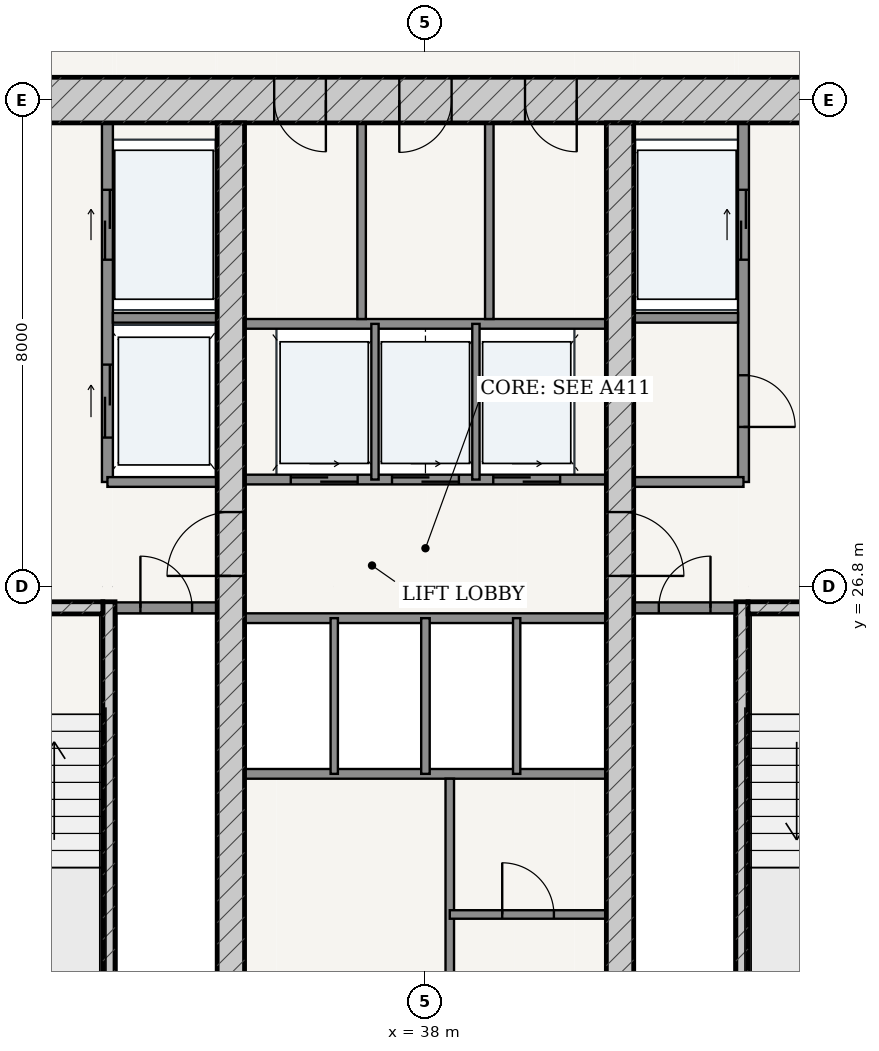
"""IFC4 building model, lengths in metres.
Left out: names, types, materials, properties, quantities, classifications, styles, units other than length and angle.
Written with IfcOpenShell. Run it as: python <this file> out.ifc"""

import sys

from ifc_helpers import new_model, si_unit, direction, frame, frame_2d, origin, place, context, subcontext, project, spatial, rectangle, extrude, source, transform, mapped, element, fill, save


model = new_model("IFC4")
c1 = context("Model", 3, precision=1e-05, world=origin(), true_north=direction((-0.2419218956, 0.970295726276)))
c2 = subcontext(c1, "Body", "Model", "MODEL_VIEW")
j1 = project(units=[si_unit("LENGTHUNIT", "METRE"), si_unit("PLANEANGLEUNIT", "RADIAN")], contexts=[c1])
p1 = place(None, origin())
s1 = spatial("IfcSite", under=j1, at=p1, CompositionType="ELEMENT")
p2 = place(p1, origin())
s2 = spatial("IfcBuilding", under=s1, at=p2, CompositionType="ELEMENT")
p3 = place(p2, frame((0.0, 0.0, 52.8)))
s3 = spatial("IfcBuildingStorey", under=s2, at=p3, CompositionType="ELEMENT", Elevation=52.8)
p4 = place(p3, frame((28.625, 34.8, 0.0), z_axis=(0.0, 0.0, 1.0), x_axis=(1.0, 0.0, 0.0)))
e1 = element("IfcWall", 1, at=p4, inside=s3, PredefinedType="SHEAR", context=c2, shape_type="SweptSolid", body=[
    extrude(rectangle(XDim=18.75, YDim=0.75, at=frame_2d((9.375, 0.0))), origin(), (0.0, 0.0, 1.0), 3.32),
])
p5 = place(p4, frame((6.887, 0.0, 0.0)))
e2 = element("IfcOpeningElement", 2, at=p5, cuts=e1, PredefinedType="OPENING", context=c2, shape_type="SweptSolid", body=[
    extrude(rectangle(XDim=0.85, YDim=2.1, at=frame_2d((0.425, 1.05))), frame((0.0, 0.385, 0.0), z_axis=(0.0, -1.0, 0.0), x_axis=(1.0, 0.0, 0.0)), (0.0, 0.0, 1.0), 0.77),
])
p6 = place(p4, frame((8.945, 0.0, 0.0)))
e3 = element("IfcOpeningElement", 3, at=p6, cuts=e1, PredefinedType="OPENING", context=c2, shape_type="SweptSolid", body=[
    extrude(rectangle(XDim=0.86, YDim=2.1, at=frame_2d((0.43, 1.05))), frame((0.0, 0.385, 0.0), z_axis=(0.0, -1.0, 0.0), x_axis=(1.0, 0.0, 0.0)), (0.0, 0.0, 1.0), 0.77),
])
p7 = place(p4, frame((11.012, 0.0, 0.0)))
e4 = element("IfcOpeningElement", 4, at=p7, cuts=e1, PredefinedType="OPENING", context=c2, shape_type="SweptSolid", body=[
    extrude(rectangle(XDim=0.85, YDim=2.1, at=frame_2d((0.425, 1.05))), frame((0.0, 0.385, 0.0), z_axis=(0.0, -1.0, 0.0), x_axis=(1.0, 0.0, 0.0)), (0.0, 0.0, 1.0), 0.77),
])
p8 = place(p3, frame((32.795, 19.175, 0.0), z_axis=(0.0, 0.0, 1.0), x_axis=(0.0, 1.0, 0.0)))
e5 = element("IfcWall", 5, at=p8, inside=s3, PredefinedType="SOLIDWALL", context=c2, shape_type="SweptSolid", body=[
    extrude(rectangle(XDim=7.375, YDim=0.2, at=frame_2d((3.688, 0.0))), origin(), (0.0, 0.0, 1.0), 3.32),
])
p9 = place(p3, frame((29.375, 26.45, 0.0), z_axis=(0.0, 0.0, 1.0), x_axis=(1.0, 0.0, 0.0)))
e6 = element("IfcWall", 6, at=p9, inside=s3, PredefinedType="SOLIDWALL", context=c2, shape_type="SweptSolid", body=[
    extrude(rectangle(XDim=3.32, YDim=0.2, at=frame_2d((1.66, 0.0))), origin(), (0.0, 0.0, 1.0), 3.32),
])
p10 = place(p9, frame((1.185, 0.0, 0.0)))
e7 = element("IfcOpeningElement", 7, at=p10, cuts=e6, PredefinedType="OPENING", context=c2, shape_type="SweptSolid", body=[
    extrude(rectangle(XDim=0.95, YDim=2.15, at=frame_2d((0.475, 1.075))), frame((0.0, 0.11, 0.0), z_axis=(0.0, -1.0, 0.0), x_axis=(1.0, 0.0, 0.0)), (0.0, 0.0, 1.0), 0.22),
])
p11 = place(p3, frame((43.205, 19.175, 0.0), z_axis=(0.0, 0.0, 1.0), x_axis=(0.0, 1.0, 0.0)))
e8 = element("IfcWall", 8, at=p11, inside=s3, PredefinedType="SOLIDWALL", context=c2, shape_type="SweptSolid", body=[
    extrude(rectangle(XDim=7.375, YDim=0.2, at=frame_2d((3.688, 0.0))), origin(), (0.0, 0.0, 1.0), 3.32),
])
p12 = place(p3, frame((43.305, 26.45, 0.0), z_axis=(0.0, 0.0, 1.0), x_axis=(1.0, 0.0, 0.0)))
e9 = element("IfcWall", 9, at=p12, inside=s3, PredefinedType="SOLIDWALL", context=c2, shape_type="SweptSolid", body=[
    extrude(rectangle(XDim=3.32, YDim=0.2, at=frame_2d((1.66, 0.0))), origin(), (0.0, 0.0, 1.0), 3.32),
])
p13 = place(p12, frame((1.185, 0.0, 0.0)))
e10 = element("IfcOpeningElement", 10, at=p13, cuts=e9, PredefinedType="OPENING", context=c2, shape_type="SweptSolid", body=[
    extrude(rectangle(XDim=0.95, YDim=2.15, at=frame_2d((0.475, 1.075))), frame((0.0, 0.11, 0.0), z_axis=(0.0, -1.0, 0.0), x_axis=(1.0, 0.0, 0.0)), (0.0, 0.0, 1.0), 0.22),
])
p14 = place(p3, frame((34.8, 19.175, 0.0), z_axis=(0.0, 0.0, 1.0), x_axis=(0.0, 1.0, 0.0)))
e11 = element("IfcWall", 11, at=p14, inside=s3, PredefinedType="SHEAR", context=c2, shape_type="SweptSolid", body=[
    extrude(rectangle(XDim=15.25, YDim=0.45, at=frame_2d((7.625, 0.0))), origin(), (0.0, 0.0, 1.0), 3.32),
])
p15 = place(p14, frame((7.8, 0.0, 0.0)))
e12 = element("IfcOpeningElement", 12, at=p15, cuts=e11, PredefinedType="OPENING", context=c2, shape_type="SweptSolid", body=[
    extrude(rectangle(XDim=1.05, YDim=2.15, at=frame_2d((0.525, 1.075))), frame((0.0, 0.235, 0.0), z_axis=(0.0, -1.0, 0.0), x_axis=(1.0, 0.0, 0.0)), (0.0, 0.0, 1.0), 0.47),
])
p16 = place(p3, frame((41.2, 19.175, 0.0), z_axis=(0.0, 0.0, 1.0), x_axis=(0.0, 1.0, 0.0)))
e13 = element("IfcWall", 13, at=p16, inside=s3, PredefinedType="SHEAR", context=c2, shape_type="SweptSolid", body=[
    extrude(rectangle(XDim=15.25, YDim=0.45, at=frame_2d((7.625, 0.0))), origin(), (0.0, 0.0, 1.0), 3.32),
])
p17 = place(p16, frame((7.8, 0.0, 0.0)))
e14 = element("IfcOpeningElement", 14, at=p17, cuts=e13, PredefinedType="OPENING", context=c2, shape_type="SweptSolid", body=[
    extrude(rectangle(XDim=1.05, YDim=2.15, at=frame_2d((0.525, 1.075))), frame((0.0, 0.235, 0.0), z_axis=(0.0, -1.0, 0.0), x_axis=(1.0, 0.0, 0.0)), (0.0, 0.0, 1.0), 0.47),
])
p18 = place(p3, frame((32.9, 26.45, 0.0), z_axis=(0.0, 0.0, 1.0), x_axis=(1.0, 0.0, 0.0)))
e15 = element("IfcWall", 15, at=p18, inside=s3, PredefinedType="PARTITIONING", context=c2, shape_type="SweptSolid", body=[
    extrude(rectangle(XDim=1.675, YDim=0.18, at=frame_2d((0.837, 0.0))), origin(), (0.0, 0.0, 1.0), 3.32),
])
p19 = place(p18, frame((0.413, 0.0, 0.0)))
e16 = element("IfcOpeningElement", 16, at=p19, cuts=e15, PredefinedType="OPENING", context=c2, shape_type="SweptSolid", body=[
    extrude(rectangle(XDim=0.85, YDim=2.1, at=frame_2d((0.425, 1.05))), frame((0.0, 0.1, 0.0), z_axis=(0.0, -1.0, 0.0), x_axis=(1.0, 0.0, 0.0)), (0.0, 0.0, 1.0), 0.2),
])
p20 = place(p3, frame((41.425, 26.45, 0.0), z_axis=(0.0, 0.0, 1.0), x_axis=(1.0, 0.0, 0.0)))
e17 = element("IfcWall", 17, at=p20, inside=s3, PredefinedType="PARTITIONING", context=c2, shape_type="SweptSolid", body=[
    extrude(rectangle(XDim=1.675, YDim=0.18, at=frame_2d((0.837, 0.0))), origin(), (0.0, 0.0, 1.0), 3.32),
])
p21 = place(p20, frame((0.413, 0.0, 0.0)))
e18 = element("IfcOpeningElement", 18, at=p21, cuts=e17, PredefinedType="OPENING", context=c2, shape_type="SweptSolid", body=[
    extrude(rectangle(XDim=0.85, YDim=2.1, at=frame_2d((0.425, 1.05))), frame((0.0, 0.1, 0.0), z_axis=(0.0, -1.0, 0.0), x_axis=(1.0, 0.0, 0.0)), (0.0, 0.0, 1.0), 0.2),
])
p22 = place(p3, frame((32.77, 28.52, 0.0), z_axis=(0.0, 0.0, 1.0), x_axis=(0.0, 1.0, 0.0)))
e19 = element("IfcWall", 19, at=p22, inside=s3, PredefinedType="PARTITIONING", context=c2, shape_type="SweptSolid", body=[
    extrude(rectangle(XDim=5.905, YDim=0.18, at=frame_2d((2.953, 0.0))), origin(), (0.0, 0.0, 1.0), 3.32),
])
p23 = place(p22, frame((3.655, 0.0, 0.0)))
e20 = element("IfcOpeningElement", 20, at=p23, cuts=e19, PredefinedType="OPENING", context=c2, shape_type="SweptSolid", body=[
    extrude(rectangle(XDim=1.15, YDim=2.2, at=frame_2d((0.575, 1.1))), frame((0.0, 0.1, 0.0), z_axis=(0.0, -1.0, 0.0), x_axis=(1.0, 0.0, 0.0)), (0.0, 0.0, 1.0), 0.2),
])
p24 = place(p22, frame((0.73, 0.0, 0.0)))
e21 = element("IfcOpeningElement", 21, at=p24, cuts=e19, PredefinedType="OPENING", context=c2, shape_type="SweptSolid", body=[
    extrude(rectangle(XDim=1.2, YDim=2.25, at=frame_2d((0.6, 1.125))), frame((0.0, 0.1, 0.0), z_axis=(0.0, -1.0, 0.0), x_axis=(1.0, 0.0, 0.0)), (0.0, 0.0, 1.0), 0.2),
])
p25 = place(p3, frame((32.86, 31.22, 0.0), z_axis=(0.0, 0.0, 1.0), x_axis=(1.0, 0.0, 0.0)))
e22 = element("IfcWall", 22, at=p25, inside=s3, PredefinedType="PARTITIONING", context=c2, shape_type="SweptSolid", body=[
    extrude(rectangle(XDim=1.715, YDim=0.16, at=frame_2d((0.857, 0.0))), origin(), (0.0, 0.0, 1.0), 3.32),
])
p26 = place(p3, frame((32.77, 28.52, 0.0), z_axis=(0.0, 0.0, 1.0), x_axis=(1.0, 0.0, 0.0)))
e23 = element("IfcWall", 23, at=p26, inside=s3, PredefinedType="PARTITIONING", context=c2, shape_type="SweptSolid", body=[
    extrude(rectangle(XDim=1.805, YDim=0.16, at=frame_2d((0.902, 0.0))), origin(), (0.0, 0.0, 1.0), 3.32),
])
p27 = place(p3, frame((43.23, 28.52, 0.0), z_axis=(0.0, 0.0, 1.0), x_axis=(0.0, 1.0, 0.0)))
e24 = element("IfcWall", 24, at=p27, inside=s3, PredefinedType="PARTITIONING", context=c2, shape_type="SweptSolid", body=[
    extrude(rectangle(XDim=5.905, YDim=0.18, at=frame_2d((2.953, 0.0))), origin(), (0.0, 0.0, 1.0), 3.32),
])
p28 = place(p27, frame((0.905, 0.0, 0.0)))
e25 = element("IfcOpeningElement", 25, at=p28, cuts=e24, PredefinedType="OPENING", context=c2, shape_type="SweptSolid", body=[
    extrude(rectangle(XDim=0.85, YDim=2.1, at=frame_2d((0.425, 1.05))), frame((0.0, 0.1, 0.0), z_axis=(0.0, -1.0, 0.0), x_axis=(1.0, 0.0, 0.0)), (0.0, 0.0, 1.0), 0.2),
])
p29 = place(p27, frame((3.655, 0.0, 0.0)))
e26 = element("IfcOpeningElement", 26, at=p29, cuts=e24, PredefinedType="OPENING", context=c2, shape_type="SweptSolid", body=[
    extrude(rectangle(XDim=1.15, YDim=2.2, at=frame_2d((0.575, 1.1))), frame((0.0, 0.1, 0.0), z_axis=(0.0, -1.0, 0.0), x_axis=(1.0, 0.0, 0.0)), (0.0, 0.0, 1.0), 0.2),
])
p30 = place(p3, frame((41.425, 31.22, 0.0), z_axis=(0.0, 0.0, 1.0), x_axis=(1.0, 0.0, 0.0)))
e27 = element("IfcWall", 27, at=p30, inside=s3, PredefinedType="PARTITIONING", context=c2, shape_type="SweptSolid", body=[
    extrude(rectangle(XDim=1.715, YDim=0.16, at=frame_2d((0.857, 0.0))), origin(), (0.0, 0.0, 1.0), 3.32),
])
p31 = place(p3, frame((41.425, 28.52, 0.0), z_axis=(0.0, 0.0, 1.0), x_axis=(1.0, 0.0, 0.0)))
e28 = element("IfcWall", 28, at=p31, inside=s3, PredefinedType="PARTITIONING", context=c2, shape_type="SweptSolid", body=[
    extrude(rectangle(XDim=1.805, YDim=0.16, at=frame_2d((0.902, 0.0))), origin(), (0.0, 0.0, 1.0), 3.32),
])
p32 = place(p3, frame((35.025, 28.56, 0.0), z_axis=(0.0, 0.0, 1.0), x_axis=(1.0, 0.0, 0.0)))
e29 = element("IfcWall", 29, at=p32, inside=s3, PredefinedType="PARTITIONING", context=c2, shape_type="SweptSolid", body=[
    extrude(rectangle(XDim=5.95, YDim=0.16, at=frame_2d((2.975, 0.0))), origin(), (0.0, 0.0, 1.0), 3.32),
])
p33 = place(p32, frame((0.76, 0.0, 0.0)))
e30 = element("IfcOpeningElement", 30, at=p33, cuts=e29, PredefinedType="OPENING", context=c2, shape_type="SweptSolid", body=[
    extrude(rectangle(XDim=1.1, YDim=2.2, at=frame_2d((0.55, 1.1))), frame((0.0, 0.09, 0.0), z_axis=(0.0, -1.0, 0.0), x_axis=(1.0, 0.0, 0.0)), (0.0, 0.0, 1.0), 0.18),
])
p34 = place(p32, frame((2.425, 0.0, 0.0)))
e31 = element("IfcOpeningElement", 31, at=p34, cuts=e29, PredefinedType="OPENING", context=c2, shape_type="SweptSolid", body=[
    extrude(rectangle(XDim=1.1, YDim=2.2, at=frame_2d((0.55, 1.1))), frame((0.0, 0.09, 0.0), z_axis=(0.0, -1.0, 0.0), x_axis=(1.0, 0.0, 0.0)), (0.0, 0.0, 1.0), 0.18),
])
p35 = place(p32, frame((4.09, 0.0, 0.0)))
e32 = element("IfcOpeningElement", 32, at=p35, cuts=e29, PredefinedType="OPENING", context=c2, shape_type="SweptSolid", body=[
    extrude(rectangle(XDim=1.1, YDim=2.2, at=frame_2d((0.55, 1.1))), frame((0.0, 0.09, 0.0), z_axis=(0.0, -1.0, 0.0), x_axis=(1.0, 0.0, 0.0)), (0.0, 0.0, 1.0), 0.18),
])
p36 = place(p3, frame((35.025, 31.12, 0.0), z_axis=(0.0, 0.0, 1.0), x_axis=(1.0, 0.0, 0.0)))
e33 = element("IfcWall", 33, at=p36, inside=s3, PredefinedType="PARTITIONING", context=c2, shape_type="SweptSolid", body=[
    extrude(rectangle(XDim=5.95, YDim=0.16, at=frame_2d((2.975, 0.0))), origin(), (0.0, 0.0, 1.0), 3.32),
])
for number, where, z_axis, x_axis in (
    (34, (37.17, 28.56, 0.0), (0.0, 0.0, 1.0), (0.0, 1.0, 0.0)),
    (35, (38.83, 28.56, 0.0), (0.0, 0.0, 1.0), (0.0, 1.0, 0.0)),
):
    element("IfcWall", number, at=place(p3, frame(where, z_axis=z_axis, x_axis=x_axis)), inside=s3, PredefinedType="PARTITIONING", context=c2, shape_type="SweptSolid", body=[
        extrude(rectangle(XDim=2.56, YDim=0.12, at=frame_2d((1.28, 0.0))), origin(), (0.0, 0.0, 1.0), 3.32),
    ])
for number, where, z_axis, x_axis in (
    (36, (36.95, 31.2, 0.0), (0.0, 0.0, 1.0), (0.0, 1.0, 0.0)),
    (37, (39.05, 31.2, 0.0), (0.0, 0.0, 1.0), (0.0, 1.0, 0.0)),
):
    element("IfcWall", number, at=place(p3, frame(where, z_axis=z_axis, x_axis=x_axis)), inside=s3, PredefinedType="PARTITIONING", context=c2, shape_type="SweptSolid", body=[
        extrude(rectangle(XDim=3.225, YDim=0.14, at=frame_2d((1.613, 0.0))), origin(), (0.0, 0.0, 1.0), 3.32),
    ])
for number, where, z_axis, x_axis in (
    (38, (35.025, 26.28, 0.0), (0.0, 0.0, 1.0), (1.0, 0.0, 0.0)),
    (39, (35.025, 23.72, 0.0), (0.0, 0.0, 1.0), (1.0, 0.0, 0.0)),
):
    element("IfcWall", number, at=place(p3, frame(where, z_axis=z_axis, x_axis=x_axis)), inside=s3, PredefinedType="PARTITIONING", context=c2, shape_type="SweptSolid", body=[
        extrude(rectangle(XDim=5.95, YDim=0.16, at=frame_2d((2.975, 0.0))), origin(), (0.0, 0.0, 1.0), 3.32),
    ])
p37 = place(p3, frame((36.5, 23.72, 0.0), z_axis=(0.0, 0.0, 1.0), x_axis=(0.0, 1.0, 0.0)))
e40 = element("IfcWall", 40, at=p37, inside=s3, PredefinedType="PARTITIONING", context=c2, shape_type="SweptSolid", body=[
    extrude(rectangle(XDim=2.56, YDim=0.12, at=frame_2d((1.28, 0.0))), origin(), (0.0, 0.0, 1.0), 3.32),
])
p38 = place(p3, frame((38.0, 23.72, 0.0), z_axis=(0.0, 0.0, 1.0), x_axis=(0.0, 1.0, 0.0)))
e41 = element("IfcWall", 41, at=p38, inside=s3, PredefinedType="PARTITIONING", context=c2, shape_type="SweptSolid", body=[
    extrude(rectangle(XDim=2.56, YDim=0.14, at=frame_2d((1.28, 0.0))), origin(), (0.0, 0.0, 1.0), 3.32),
])
p39 = place(p3, frame((39.5, 23.72, 0.0), z_axis=(0.0, 0.0, 1.0), x_axis=(0.0, 1.0, 0.0)))
e42 = element("IfcWall", 42, at=p39, inside=s3, PredefinedType="PARTITIONING", context=c2, shape_type="SweptSolid", body=[
    extrude(rectangle(XDim=2.56, YDim=0.12, at=frame_2d((1.28, 0.0))), origin(), (0.0, 0.0, 1.0), 3.32),
])
p40 = place(p3, frame((38.4, 19.175, 0.0), z_axis=(0.0, 0.0, 1.0), x_axis=(0.0, 1.0, 0.0)))
e43 = element("IfcWall", 43, at=p40, inside=s3, PredefinedType="PARTITIONING", context=c2, shape_type="SweptSolid", body=[
    extrude(rectangle(XDim=4.465, YDim=0.14, at=frame_2d((2.232, 0.0))), origin(), (0.0, 0.0, 1.0), 3.32),
])
p41 = place(p3, frame((38.4, 21.407, 0.0), z_axis=(0.0, 0.0, 1.0), x_axis=(1.0, 0.0, 0.0)))
e44 = element("IfcWall", 44, at=p41, inside=s3, PredefinedType="PARTITIONING", context=c2, shape_type="SweptSolid", body=[
    extrude(rectangle(XDim=2.575, YDim=0.14, at=frame_2d((1.288, 0.0))), origin(), (0.0, 0.0, 1.0), 3.32),
])
p42 = place(p41, frame((0.863, 0.0, 0.0)))
e45 = element("IfcOpeningElement", 45, at=p42, cuts=e44, PredefinedType="OPENING", context=c2, shape_type="SweptSolid", body=[
    extrude(rectangle(XDim=0.85, YDim=2.1, at=frame_2d((0.425, 1.05))), frame((0.0, 0.08, 0.0), z_axis=(0.0, -1.0, 0.0), x_axis=(1.0, 0.0, 0.0)), (0.0, 0.0, 1.0), 0.16),
])
m1 = source(origin(), c2, "Body", "SweptSolid", [
    extrude(rectangle(XDim=1.05, YDim=2.15, at=frame_2d((0.525, 1.075))), frame((0.0, 0.025, 0.0), z_axis=(0.0, -1.0, 0.0), x_axis=(1.0, 0.0, 0.0)), (0.0, 0.0, 1.0), 0.05),
])
p43 = place(p15, origin())
e46 = element("IfcDoor", 46, at=p43, inside=s3, OperationType="SINGLE_SWING_LEFT", PredefinedType="DOOR", context=c2, shape_type="MappedRepresentation", body=[
    mapped(m1, transform((0.0, 0.0, 0.0), scale=1.0)),
])
fill(e12, e46)
p44 = place(p17, frame((1.05, 0.0, 0.0), z_axis=(0.0, 0.0, 1.0), x_axis=(-1.0, 0.0, 0.0)))
e47 = element("IfcDoor", 47, at=p44, inside=s3, OperationType="SINGLE_SWING_RIGHT", PredefinedType="DOOR", context=c2, shape_type="MappedRepresentation", body=[
    mapped(m1, transform((0.0, 0.0, 0.0), scale=1.0)),
])
fill(e14, e47)
m2 = source(origin(), c2, "Body", "SweptSolid", [
    extrude(rectangle(XDim=0.85, YDim=2.1, at=frame_2d((0.425, 1.05))), frame((0.0, 0.025, 0.0), z_axis=(0.0, -1.0, 0.0), x_axis=(1.0, 0.0, 0.0)), (0.0, 0.0, 1.0), 0.05),
])
p45 = place(p19, origin())
e48 = element("IfcDoor", 48, at=p45, inside=s3, OperationType="SINGLE_SWING_LEFT", PredefinedType="DOOR", context=c2, shape_type="MappedRepresentation", body=[
    mapped(m2, transform((0.0, 0.0, 0.0), scale=1.0)),
])
fill(e16, e48)
p46 = place(p21, origin())
e49 = element("IfcDoor", 49, at=p46, inside=s3, OperationType="SINGLE_SWING_RIGHT", PredefinedType="DOOR", context=c2, shape_type="MappedRepresentation", body=[
    mapped(m2, transform((0.0, 0.0, 0.0), scale=1.0)),
])
fill(e18, e49)
p47 = place(p28, frame((0.85, 0.0, 0.0), z_axis=(0.0, 0.0, 1.0), x_axis=(-1.0, 0.0, 0.0)))
e50 = element("IfcDoor", 50, at=p47, inside=s3, OperationType="SINGLE_SWING_RIGHT", PredefinedType="DOOR", context=c2, shape_type="MappedRepresentation", body=[
    mapped(m2, transform((0.0, 0.0, 0.0), scale=1.0)),
])
fill(e25, e50)
p48 = place(p5, frame((0.85, 0.0, 0.0), z_axis=(0.0, 0.0, 1.0), x_axis=(-1.0, 0.0, 0.0)))
e51 = element("IfcDoor", 51, at=p48, inside=s3, OperationType="SINGLE_SWING_LEFT", PredefinedType="DOOR", context=c2, shape_type="MappedRepresentation", body=[
    mapped(m2, transform((0.0, 0.0, 0.0), scale=1.0)),
])
fill(e2, e51)
m3 = source(origin(), c2, "Body", "SweptSolid", [
    extrude(rectangle(XDim=0.86, YDim=2.1, at=frame_2d((0.43, 1.05))), frame((0.0, 0.025, 0.0), z_axis=(0.0, -1.0, 0.0), x_axis=(1.0, 0.0, 0.0)), (0.0, 0.0, 1.0), 0.05),
])
p49 = place(p6, frame((0.86, 0.0, 0.0), z_axis=(0.0, 0.0, 1.0), x_axis=(-1.0, 0.0, 0.0)))
e52 = element("IfcDoor", 52, at=p49, inside=s3, OperationType="SINGLE_SWING_RIGHT", PredefinedType="DOOR", context=c2, shape_type="MappedRepresentation", body=[
    mapped(m3, transform((0.0, 0.0, 0.0), scale=1.0)),
])
fill(e3, e52)
p50 = place(p7, frame((0.85, 0.0, 0.0), z_axis=(0.0, 0.0, 1.0), x_axis=(-1.0, 0.0, 0.0)))
e53 = element("IfcDoor", 53, at=p50, inside=s3, OperationType="SINGLE_SWING_LEFT", PredefinedType="DOOR", context=c2, shape_type="MappedRepresentation", body=[
    mapped(m2, transform((0.0, 0.0, 0.0), scale=1.0)),
])
fill(e4, e53)
p51 = place(p42, origin())
e54 = element("IfcDoor", 54, at=p51, inside=s3, OperationType="SINGLE_SWING_LEFT", PredefinedType="DOOR", context=c2, shape_type="MappedRepresentation", body=[
    mapped(m2, transform((0.0, 0.0, 0.0), scale=1.0)),
])
fill(e45, e54)
m4 = source(origin(), c2, "Body", "SweptSolid", [
    extrude(rectangle(XDim=1.15, YDim=2.2, at=frame_2d((0.575, 1.1))), frame((0.0, 0.025, 0.0), z_axis=(0.0, -1.0, 0.0), x_axis=(1.0, 0.0, 0.0)), (0.0, 0.0, 1.0), 0.05),
])
p52 = place(p23, origin())
e55 = element("IfcDoor", 55, at=p52, inside=s3, OperationType="DOUBLE_DOOR_SLIDING", PredefinedType="DOOR", context=c2, shape_type="MappedRepresentation", body=[
    mapped(m4, transform((0.0, 0.0, 0.0), scale=1.0)),
])
fill(e20, e55)
p53 = place(p29, origin())
e56 = element("IfcDoor", 56, at=p53, inside=s3, OperationType="DOUBLE_DOOR_SLIDING", PredefinedType="DOOR", context=c2, shape_type="MappedRepresentation", body=[
    mapped(m4, transform((0.0, 0.0, 0.0), scale=1.0)),
])
fill(e26, e56)
m5 = source(origin(), c2, "Body", "SweptSolid", [
    extrude(rectangle(XDim=1.2, YDim=2.25, at=frame_2d((0.6, 1.125))), frame((0.0, 0.025, 0.0), z_axis=(0.0, -1.0, 0.0), x_axis=(1.0, 0.0, 0.0)), (0.0, 0.0, 1.0), 0.05),
])
p54 = place(p24, origin())
e57 = element("IfcDoor", 57, at=p54, inside=s3, OperationType="DOUBLE_DOOR_SLIDING", PredefinedType="DOOR", context=c2, shape_type="MappedRepresentation", body=[
    mapped(m5, transform((0.0, 0.0, 0.0), scale=1.0)),
])
fill(e21, e57)
m6 = source(origin(), c2, "Body", "SweptSolid", [
    extrude(rectangle(XDim=1.1, YDim=2.2, at=frame_2d((0.55, 1.1))), frame((0.0, 0.025, 0.0), z_axis=(0.0, -1.0, 0.0), x_axis=(1.0, 0.0, 0.0)), (0.0, 0.0, 1.0), 0.05),
])
p55 = place(p33, origin())
e58 = element("IfcDoor", 58, at=p55, inside=s3, OperationType="DOUBLE_DOOR_SLIDING", PredefinedType="DOOR", context=c2, shape_type="MappedRepresentation", body=[
    mapped(m6, transform((0.0, 0.0, 0.0), scale=1.0)),
])
fill(e30, e58)
p56 = place(p34, origin())
e59 = element("IfcDoor", 59, at=p56, inside=s3, OperationType="DOUBLE_DOOR_SLIDING", PredefinedType="DOOR", context=c2, shape_type="MappedRepresentation", body=[
    mapped(m6, transform((0.0, 0.0, 0.0), scale=1.0)),
])
fill(e31, e59)
p57 = place(p35, origin())
e60 = element("IfcDoor", 60, at=p57, inside=s3, OperationType="DOUBLE_DOOR_SLIDING", PredefinedType="DOOR", context=c2, shape_type="MappedRepresentation", body=[
    mapped(m6, transform((0.0, 0.0, 0.0), scale=1.0)),
])
fill(e32, e60)
save(model, sys.argv[1])
